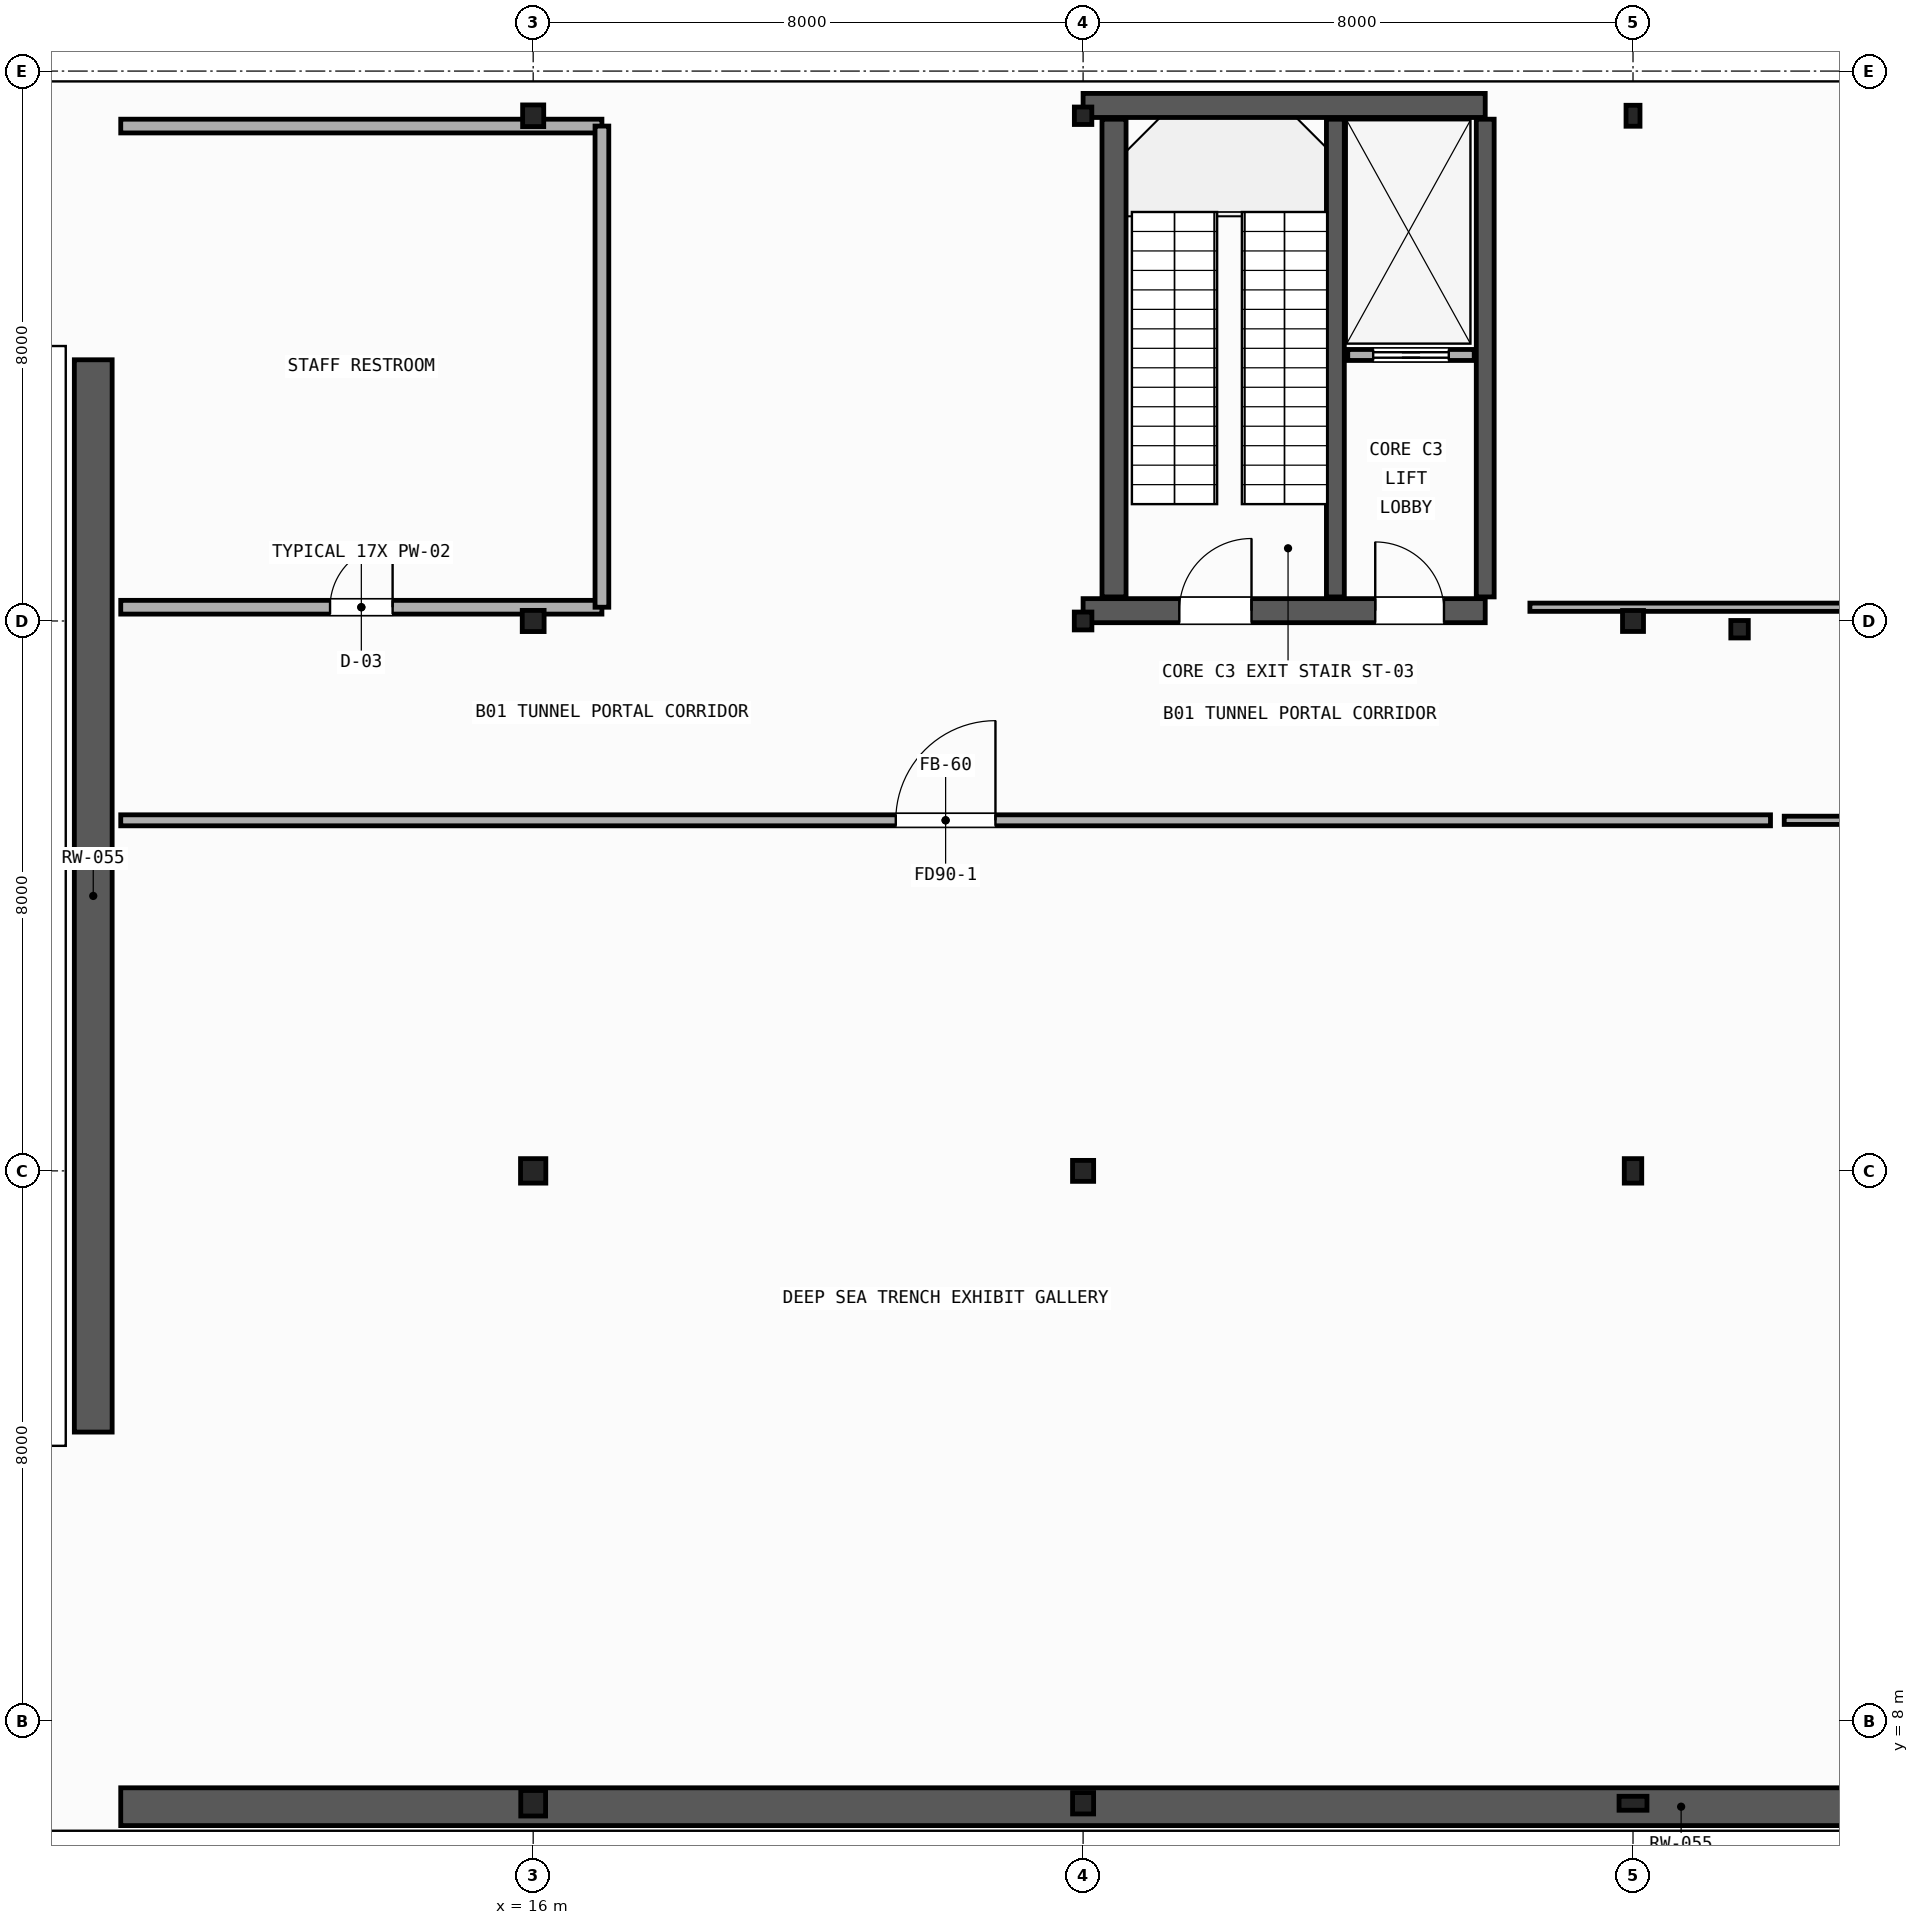
"""IFC4 building model, lengths in metres.
Left out: names, types, materials, properties, quantities, classifications, styles, units other than length and angle.
Written with IfcOpenShell. Run it as: python <this file> out.ifc"""

import sys

from ifc_helpers import new_model, si_unit, direction, frame, frame_2d, origin, origin_2d, place, context, subcontext, project, spatial, rectangle, hollow_rectangle, i_section, extrude, element, fill, save


model = new_model("IFC4")
c1 = context("Model", 3, precision=1e-05, world=origin(), true_north=direction((0.0, 1.0)))
c2 = subcontext(c1, "Body", "Model", "MODEL_VIEW")
j1 = project(units=[si_unit("LENGTHUNIT", "METRE"), si_unit("PLANEANGLEUNIT", "RADIAN")], contexts=[c1])
p1 = place(None, origin())
s1 = spatial("IfcSite", under=j1, at=p1, CompositionType="ELEMENT")
p2 = place(p1, origin())
s2 = spatial("IfcBuilding", under=s1, at=p2, CompositionType="ELEMENT")
p3 = place(p2, frame((0.0, 0.0, -5.4)))
s3 = spatial("IfcBuildingStorey", under=s2, at=p3, CompositionType="ELEMENT", Elevation=-5.4)
p4 = place(p3, frame((16.0, 6.8, 0.0), z_axis=(0.0, 0.0, 1.0), x_axis=(0.0, 1.0, 0.0)))
e1 = element("IfcColumn", 1, at=p4, inside=s3, PredefinedType="COLUMN", context=c2, shape_type="SweptSolid", body=[
    extrude(i_section(OverallWidth=0.371, OverallDepth=0.361, WebThickness=0.012, FlangeThickness=0.02, FilletRadius=0.015, at=origin_2d()), origin(), (0.0, 0.0, 1.0), 5.08),
])
p5 = place(p3, frame((16.0, 16.0, 0.0), z_axis=(0.0, 0.0, 1.0), x_axis=(1.0, 0.0, 0.0)))
e2 = element("IfcColumn", 2, at=p5, inside=s3, PredefinedType="COLUMN", context=c2, shape_type="SweptSolid", body=[
    extrude(i_section(OverallWidth=0.368, OverallDepth=0.356, WebThickness=0.011, FlangeThickness=0.018, FilletRadius=0.015, at=origin_2d()), origin(), (0.0, 0.0, 1.0), 5.08),
])
p6 = place(p3, frame((16.0, 24.0, 0.0), z_axis=(0.0, 0.0, 1.0), x_axis=(0.0, 1.0, 0.0)))
e3 = element("IfcColumn", 3, at=p6, inside=s3, PredefinedType="COLUMN", context=c2, shape_type="SweptSolid", body=[
    extrude(i_section(OverallWidth=0.308, OverallDepth=0.318, WebThickness=0.013, FlangeThickness=0.021, FilletRadius=0.013, at=origin_2d()), origin(), (0.0, 0.0, 1.0), 5.08),
])
p7 = place(p3, frame((16.0, 31.35, 0.0), z_axis=(0.0, 0.0, 1.0), x_axis=(1.0, 0.0, 0.0)))
e4 = element("IfcColumn", 4, at=p7, inside=s3, PredefinedType="COLUMN", context=c2, shape_type="SweptSolid", body=[
    extrude(i_section(OverallWidth=0.307, OverallDepth=0.315, WebThickness=0.012, FlangeThickness=0.019, FilletRadius=0.013, at=origin_2d()), origin(), (0.0, 0.0, 1.0), 5.08),
])
p8 = place(p3, frame((24.0, 6.8, 0.0), z_axis=(0.0, 0.0, 1.0), x_axis=(1.0, 0.0, 0.0)))
e5 = element("IfcColumn", 5, at=p8, inside=s3, PredefinedType="COLUMN", context=c2, shape_type="SweptSolid", body=[
    extrude(i_section(OverallWidth=0.306, OverallDepth=0.311, WebThickness=0.011, FlangeThickness=0.017, FilletRadius=0.013, at=origin_2d()), origin(), (0.0, 0.0, 1.0), 5.08),
])
p9 = place(p3, frame((24.0, 16.0, 0.0), z_axis=(0.0, 0.0, 1.0), x_axis=(0.0, 1.0, 0.0)))
e6 = element("IfcColumn", 6, at=p9, inside=s3, PredefinedType="COLUMN", context=c2, shape_type="SweptSolid", body=[
    extrude(i_section(OverallWidth=0.305, OverallDepth=0.307, WebThickness=0.01, FlangeThickness=0.015, FilletRadius=0.013, at=origin_2d()), origin(), (0.0, 0.0, 1.0), 5.08),
])
p10 = place(p3, frame((24.0, 24.0, 0.0), z_axis=(0.0, 0.0, 1.0), x_axis=(1.0, 0.0, 0.0)))
e7 = element("IfcColumn", 7, at=p10, inside=s3, PredefinedType="COLUMN", context=c2, shape_type="SweptSolid", body=[
    extrude(i_section(OverallWidth=0.256, OverallDepth=0.26, WebThickness=0.011, FlangeThickness=0.017, FilletRadius=0.011, at=origin_2d()), origin(), (0.0, 0.0, 1.0), 5.08),
])
p11 = place(p3, frame((24.0, 31.35, 0.0), z_axis=(0.0, 0.0, 1.0), x_axis=(0.0, 1.0, 0.0)))
e8 = element("IfcColumn", 8, at=p11, inside=s3, PredefinedType="COLUMN", context=c2, shape_type="SweptSolid", body=[
    extrude(i_section(OverallWidth=0.254, OverallDepth=0.254, WebThickness=0.009, FlangeThickness=0.014, FilletRadius=0.011, at=origin_2d()), origin(), (0.0, 0.0, 1.0), 5.08),
])
p12 = place(p3, frame((32.0, 6.8, 0.0), z_axis=(0.0, 0.0, 1.0), x_axis=(0.0, 1.0, 0.0)))
e9 = element("IfcColumn", 9, at=p12, inside=s3, PredefinedType="COLUMN", context=c2, shape_type="SweptSolid", body=[
    extrude(hollow_rectangle(XDim=0.203, YDim=0.406, WallThickness=0.012, InnerFilletRadius=0.012, OuterFilletRadius=0.024, at=origin_2d()), origin(), (0.0, 0.0, 1.0), 5.08),
])
p13 = place(p3, frame((32.0, 16.0, 0.0), z_axis=(0.0, 0.0, 1.0), x_axis=(1.0, 0.0, 0.0)))
e10 = element("IfcColumn", 10, at=p13, inside=s3, PredefinedType="COLUMN", context=c2, shape_type="SweptSolid", body=[
    extrude(hollow_rectangle(XDim=0.254, YDim=0.356, WallThickness=0.012, InnerFilletRadius=0.012, OuterFilletRadius=0.024, at=origin_2d()), origin(), (0.0, 0.0, 1.0), 5.08),
])
p14 = place(p3, frame((32.0, 24.0, 0.0), z_axis=(0.0, 0.0, 1.0), x_axis=(0.0, 1.0, 0.0)))
e11 = element("IfcColumn", 11, at=p14, inside=s3, PredefinedType="COLUMN", context=c2, shape_type="SweptSolid", body=[
    extrude(hollow_rectangle(XDim=0.305, YDim=0.305, WallThickness=0.012, InnerFilletRadius=0.012, OuterFilletRadius=0.024, at=origin_2d()), origin(), (0.0, 0.0, 1.0), 5.08),
])
p15 = place(p3, frame((32.0, 31.35, 0.0), z_axis=(0.0, 0.0, 1.0), x_axis=(1.0, 0.0, 0.0)))
e12 = element("IfcColumn", 12, at=p15, inside=s3, PredefinedType="COLUMN", context=c2, shape_type="SweptSolid", body=[
    extrude(hollow_rectangle(XDim=0.203, YDim=0.305, WallThickness=0.009, InnerFilletRadius=0.009, OuterFilletRadius=0.018, at=origin_2d()), origin(), (0.0, 0.0, 1.0), 5.08),
])
p16 = place(p3, frame((10.0, 6.75, 0.0), z_axis=(0.0, 0.0, 1.0), x_axis=(1.0, 0.0, 0.0)))
e13 = element("IfcWall", 13, at=p16, inside=s3, PredefinedType="USERDEFINED", context=c2, shape_type="SweptSolid", body=[
    extrude(rectangle(XDim=45.4, YDim=0.55, at=frame_2d((22.7, 0.0))), origin(), (0.0, 0.0, 1.0), 5.06),
])
p17 = place(p3, frame((9.6, 12.2, 0.0), z_axis=(0.0, 0.0, 1.0), x_axis=(0.0, 1.0, 0.0)))
e14 = element("IfcWall", 14, at=p17, inside=s3, PredefinedType="USERDEFINED", context=c2, shape_type="SweptSolid", body=[
    extrude(rectangle(XDim=15.6, YDim=0.55, at=frame_2d((7.8, 0.0))), origin(), (0.0, 0.0, 1.0), 5.06),
])
p18 = place(p3, frame((24.0, 24.15, 0.0), z_axis=(0.0, 0.0, 1.0), x_axis=(1.0, 0.0, 0.0)))
e15 = element("IfcWall", 15, at=p18, inside=s3, PredefinedType="SHEAR", context=c2, shape_type="SweptSolid", body=[
    extrude(rectangle(XDim=5.85, YDim=0.35, at=frame_2d((2.925, 0.0))), origin(), (0.0, 0.0, 1.0), 5.07),
])
p19 = place(p18, frame((1.4, 0.0, 0.0)))
e16 = element("IfcOpeningElement", 16, at=p19, cuts=e15, PredefinedType="OPENING", context=c2, shape_type="SweptSolid", body=[
    extrude(rectangle(XDim=1.05, YDim=2.1, at=frame_2d((0.525, 1.05))), frame((0.0, 0.185, 0.0), z_axis=(0.0, -1.0, 0.0), x_axis=(1.0, 0.0, 0.0)), (0.0, 0.0, 1.0), 0.37),
])
p20 = place(p18, frame((4.25, 0.0, 0.0)))
e17 = element("IfcOpeningElement", 17, at=p20, cuts=e15, PredefinedType="OPENING", context=c2, shape_type="SweptSolid", body=[
    extrude(rectangle(XDim=1.0, YDim=2.15, at=frame_2d((0.5, 1.075))), frame((0.0, 0.185, 0.0), z_axis=(0.0, -1.0, 0.0), x_axis=(1.0, 0.0, 0.0)), (0.0, 0.0, 1.0), 0.37),
])
p21 = place(p3, frame((24.0, 31.5, 0.0), z_axis=(0.0, 0.0, 1.0), x_axis=(1.0, 0.0, 0.0)))
e18 = element("IfcWall", 18, at=p21, inside=s3, PredefinedType="SHEAR", context=c2, shape_type="SweptSolid", body=[
    extrude(rectangle(XDim=5.85, YDim=0.35, at=frame_2d((2.925, 0.0))), origin(), (0.0, 0.0, 1.0), 5.07),
])
p22 = place(p3, frame((24.45, 24.35, 0.0), z_axis=(0.0, 0.0, 1.0), x_axis=(0.0, 1.0, 0.0)))
e19 = element("IfcWall", 19, at=p22, inside=s3, PredefinedType="SHEAR", context=c2, shape_type="SweptSolid", body=[
    extrude(rectangle(XDim=6.95, YDim=0.35, at=frame_2d((3.475, 0.0))), origin(), (0.0, 0.0, 1.0), 5.07),
])
for number, where, z_axis, x_axis in (
    (20, (29.85, 24.35, 0.0), (0.0, 0.0, 1.0), (0.0, 1.0, 0.0)),
    (21, (27.67, 24.35, 0.0), (0.0, 0.0, 1.0), (0.0, 1.0, 0.0)),
):
    element("IfcWall", number, at=place(p3, frame(where, z_axis=z_axis, x_axis=x_axis)), inside=s3, PredefinedType="SHEAR", context=c2, shape_type="SweptSolid", body=[
        extrude(rectangle(XDim=6.95, YDim=0.26, at=frame_2d((3.475, 0.0))), origin(), (0.0, 0.0, 1.0), 5.07),
    ])
p23 = place(p3, frame((27.85, 27.87, 0.0), z_axis=(0.0, 0.0, 1.0), x_axis=(1.0, 0.0, 0.0)))
e22 = element("IfcWall", 22, at=p23, inside=s3, PredefinedType="PARTITIONING", context=c2, shape_type="SweptSolid", body=[
    extrude(rectangle(XDim=1.84, YDim=0.16, at=frame_2d((0.92, 0.0))), origin(), (0.0, 0.0, 1.0), 3.6),
])
p24 = place(p23, frame((0.37, 0.0, 0.0)))
e23 = element("IfcOpeningElement", 23, at=p24, cuts=e22, PredefinedType="OPENING", context=c2, shape_type="SweptSolid", body=[
    extrude(rectangle(XDim=1.1, YDim=2.15, at=frame_2d((0.55, 1.075))), frame((0.0, 0.09, 0.0), z_axis=(0.0, -1.0, 0.0), x_axis=(1.0, 0.0, 0.0)), (0.0, 0.0, 1.0), 0.18),
])
p25 = place(p3, frame((33.55, 23.88, 0.0), z_axis=(0.0, 0.0, 1.0), x_axis=(1.0, 0.0, 0.0)))
e24 = element("IfcColumn", 24, at=p25, inside=s3, PredefinedType="COLUMN", context=c2, shape_type="SweptSolid", body=[
    extrude(hollow_rectangle(XDim=0.254, YDim=0.254, WallThickness=0.012, InnerFilletRadius=0.012, OuterFilletRadius=0.024, at=origin_2d()), origin(), (0.0, 0.0, 1.0), 5.06),
])
p26 = place(p3, frame((10.0, 21.1, 0.0), z_axis=(0.0, 0.0, 1.0), x_axis=(1.0, 0.0, 0.0)))
e25 = element("IfcWall", 25, at=p26, inside=s3, PredefinedType="PARTITIONING", context=c2, shape_type="SweptSolid", body=[
    extrude(rectangle(XDim=24.0, YDim=0.16, at=frame_2d((12.0, 0.0))), origin(), (0.0, 0.0, 1.0), 4.29),
])
p27 = place(p26, frame((11.275, 0.0, 0.0)))
e26 = element("IfcOpeningElement", 26, at=p27, cuts=e25, PredefinedType="OPENING", context=c2, shape_type="SweptSolid", body=[
    extrude(rectangle(XDim=1.45, YDim=2.25, at=frame_2d((0.725, 1.125))), frame((0.0, 0.09, 0.0), z_axis=(0.0, -1.0, 0.0), x_axis=(1.0, 0.0, 0.0)), (0.0, 0.0, 1.0), 0.18),
])
p28 = place(p3, frame((34.2, 21.1, 0.0), z_axis=(0.0, 0.0, 1.0), x_axis=(1.0, 0.0, 0.0)))
e27 = element("IfcWall", 27, at=p28, inside=s3, PredefinedType="PARTITIONING", context=c2, shape_type="SweptSolid", body=[
    extrude(rectangle(XDim=20.8, YDim=0.12, at=frame_2d((10.4, 0.0))), origin(), (0.0, 0.0, 1.0), 4.278),
])
p29 = place(p28, frame((9.725, 0.0, 0.0)))
e28 = element("IfcOpeningElement", 28, at=p29, cuts=e27, PredefinedType="OPENING", context=c2, shape_type="SweptSolid", body=[
    extrude(rectangle(XDim=1.35, YDim=2.25, at=frame_2d((0.675, 1.125))), frame((0.0, 0.07, 0.0), z_axis=(0.0, -1.0, 0.0), x_axis=(1.0, 0.0, 0.0)), (0.0, 0.0, 1.0), 0.14),
])
p30 = place(p3, frame((10.0, 24.2, 0.0), z_axis=(0.0, 0.0, 1.0), x_axis=(1.0, 0.0, 0.0)))
e29 = element("IfcWall", 29, at=p30, inside=s3, PredefinedType="PLUMBINGWALL", context=c2, shape_type="SweptSolid", body=[
    extrude(rectangle(XDim=7.0, YDim=0.2, at=frame_2d((3.5, 0.0))), origin(), (0.0, 0.0, 1.0), 4.29),
])
p31 = place(p30, frame((3.045, 0.0, 0.0)))
e30 = element("IfcOpeningElement", 30, at=p31, cuts=e29, PredefinedType="OPENING", context=c2, shape_type="SweptSolid", body=[
    extrude(rectangle(XDim=0.91, YDim=2.1, at=frame_2d((0.455, 1.05))), frame((0.0, 0.11, 0.0), z_axis=(0.0, -1.0, 0.0), x_axis=(1.0, 0.0, 0.0)), (0.0, 0.0, 1.0), 0.22),
])
p32 = place(p3, frame((10.0, 31.2, 0.0), z_axis=(0.0, 0.0, 1.0), x_axis=(1.0, 0.0, 0.0)))
e31 = element("IfcWall", 31, at=p32, inside=s3, PredefinedType="PLUMBINGWALL", context=c2, shape_type="SweptSolid", body=[
    extrude(rectangle(XDim=7.0, YDim=0.2, at=frame_2d((3.5, 0.0))), origin(), (0.0, 0.0, 1.0), 4.24),
])
p33 = place(p3, frame((17.0, 24.2, 0.0), z_axis=(0.0, 0.0, 1.0), x_axis=(0.0, 1.0, 0.0)))
e32 = element("IfcWall", 32, at=p33, inside=s3, PredefinedType="PLUMBINGWALL", context=c2, shape_type="SweptSolid", body=[
    extrude(rectangle(XDim=7.0, YDim=0.2, at=frame_2d((3.5, 0.0))), origin(), (0.0, 0.0, 1.0), 4.29),
])
p34 = place(p3, frame((30.5, 24.2, 0.0), z_axis=(0.0, 0.0, 1.0), x_axis=(1.0, 0.0, 0.0)))
e33 = element("IfcWall", 33, at=p34, inside=s3, PredefinedType="PARTITIONING", context=c2, shape_type="SweptSolid", body=[
    extrude(rectangle(XDim=24.5, YDim=0.12, at=frame_2d((12.25, 0.0))), origin(), (0.0, 0.0, 1.0), 4.278),
])
p35 = place(p34, frame((11.77, 0.0, 0.0)))
e34 = element("IfcOpeningElement", 34, at=p35, cuts=e33, PredefinedType="OPENING", context=c2, shape_type="SweptSolid", body=[
    extrude(rectangle(XDim=0.96, YDim=2.1, at=frame_2d((0.48, 1.05))), frame((0.0, 0.07, 0.0), z_axis=(0.0, -1.0, 0.0), x_axis=(1.0, 0.0, 0.0)), (0.0, 0.0, 1.0), 0.14),
])
p36 = place(p24, origin())
e35 = element("IfcDoor", 35, at=p36, inside=s3, OperationType="SLIDING_TO_LEFT", PredefinedType="DOOR", context=c2, shape_type="SweptSolid", body=[
    extrude(rectangle(XDim=1.1, YDim=2.15, at=frame_2d((0.55, 1.075))), frame((0.0, 0.025, 0.0), z_axis=(0.0, -1.0, 0.0), x_axis=(1.0, 0.0, 0.0)), (0.0, 0.0, 1.0), 0.05),
])
fill(e23, e35)
p37 = place(p19, origin())
e36 = element("IfcDoor", 36, at=p37, inside=s3, OperationType="SINGLE_SWING_RIGHT", PredefinedType="DOOR", context=c2, shape_type="SweptSolid", body=[
    extrude(rectangle(XDim=1.05, YDim=2.1, at=frame_2d((0.525, 1.05))), frame((0.0, 0.025, 0.0), z_axis=(0.0, -1.0, 0.0), x_axis=(1.0, 0.0, 0.0)), (0.0, 0.0, 1.0), 0.05),
])
fill(e16, e36)
p38 = place(p20, origin())
e37 = element("IfcDoor", 37, at=p38, inside=s3, OperationType="SINGLE_SWING_LEFT", PredefinedType="DOOR", context=c2, shape_type="SweptSolid", body=[
    extrude(rectangle(XDim=1.0, YDim=2.15, at=frame_2d((0.5, 1.075))), frame((0.0, 0.025, 0.0), z_axis=(0.0, -1.0, 0.0), x_axis=(1.0, 0.0, 0.0)), (0.0, 0.0, 1.0), 0.05),
])
fill(e17, e37)
p39 = place(p27, origin())
e38 = element("IfcDoor", 38, at=p39, inside=s3, OperationType="SINGLE_SWING_RIGHT", PredefinedType="DOOR", context=c2, shape_type="SweptSolid", body=[
    extrude(rectangle(XDim=1.45, YDim=2.25, at=frame_2d((0.725, 1.125))), frame((0.0, 0.025, 0.0), z_axis=(0.0, -1.0, 0.0), x_axis=(1.0, 0.0, 0.0)), (0.0, 0.0, 1.0), 0.05),
])
fill(e26, e38)
p40 = place(p31, origin())
e39 = element("IfcDoor", 39, at=p40, inside=s3, OperationType="SINGLE_SWING_RIGHT", PredefinedType="DOOR", context=c2, shape_type="SweptSolid", body=[
    extrude(rectangle(XDim=0.91, YDim=2.1, at=frame_2d((0.455, 1.05))), frame((0.0, 0.025, 0.0), z_axis=(0.0, -1.0, 0.0), x_axis=(1.0, 0.0, 0.0)), (0.0, 0.0, 1.0), 0.05),
])
fill(e30, e39)
save(model, sys.argv[1])
